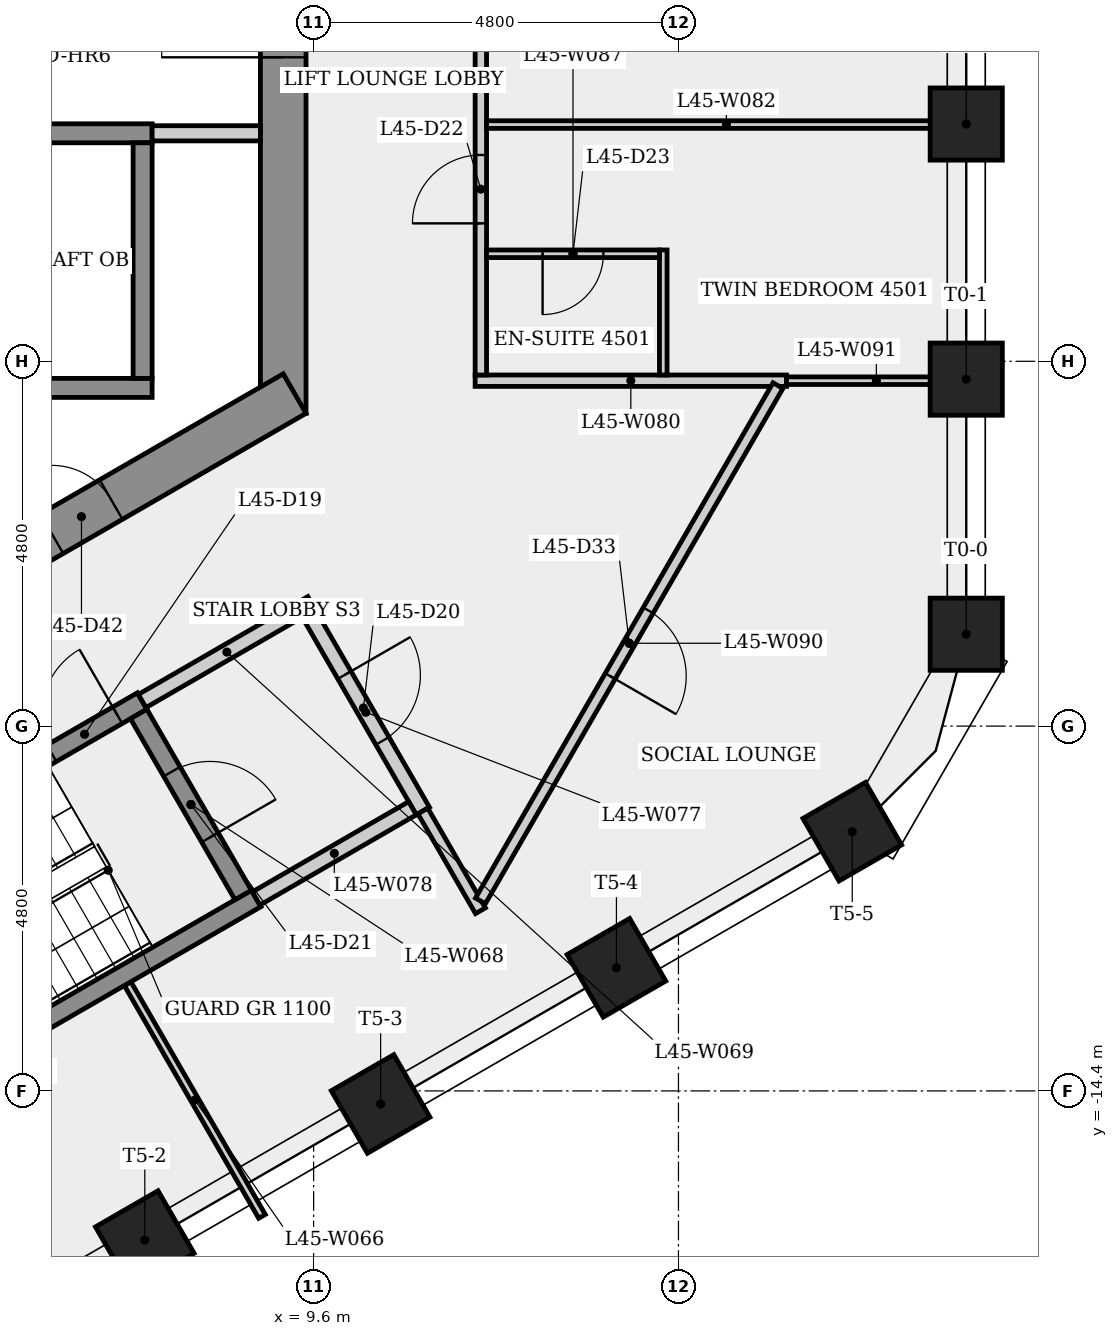
"""IFC4 building model, lengths in metres.
Left out: names, types, materials, properties, quantities, classifications, styles, units other than length and angle.
Written with IfcOpenShell. Run it as: python <this file> out.ifc"""

import sys

from ifc_helpers import new_model, si_unit, direction, frame, frame_2d, origin, origin_2d, place, context, subcontext, project, spatial, rectangle, extrude, element, fill, save


model = new_model("IFC4")
c1 = context("Model", 3, precision=1e-05, world=origin(), true_north=direction((0.0, 1.0)))
c2 = subcontext(c1, "Body", "Model", "MODEL_VIEW")
j1 = project(units=[si_unit("LENGTHUNIT", "METRE"), si_unit("PLANEANGLEUNIT", "RADIAN")], contexts=[c1])
p1 = place(None, origin())
s1 = spatial("IfcSite", under=j1, at=p1, CompositionType="ELEMENT")
p2 = place(p1, origin())
s2 = spatial("IfcBuilding", under=s1, at=p2, CompositionType="ELEMENT")
p3 = place(p2, frame((0.0, 0.0, 169.7)))
s3 = spatial("IfcBuildingStorey", under=s2, at=p3, CompositionType="ELEMENT", Elevation=169.7)
p4 = place(p3, frame((9.2, -5.485, 0.0), z_axis=(0.0, 0.0, 1.0), x_axis=(0.0, 1.0, 0.0)))
e1 = element("IfcWall", 1, at=p4, inside=s3, PredefinedType="SHEAR", context=c2, shape_type="SweptSolid", body=[
    extrude(rectangle(XDim=10.97, YDim=0.6, at=frame_2d((5.485, 0.0))), origin(), (0.0, 0.0, 1.0), 3.4),
])
p5 = place(p4, frame((4.685, 0.0, 0.0)))
e2 = element("IfcOpeningElement", 2, at=p5, cuts=e1, PredefinedType="OPENING", context=c2, shape_type="SweptSolid", body=[
    extrude(rectangle(XDim=1.6, YDim=2.1, at=frame_2d((0.8, 1.05))), frame((0.0, 0.31, 0.0), z_axis=(0.0, -1.0, 0.0), x_axis=(1.0, 0.0, 0.0)), (0.0, 0.0, 1.0), 0.62),
])
p6 = place(p3, frame((-0.15, -10.71, 0.0), z_axis=(0.0, 0.0, 1.0), x_axis=(0.866023993627, 0.500002442456, 0.0)))
e3 = element("IfcWall", 3, at=p6, inside=s3, PredefinedType="SHEAR", context=c2, shape_type="SweptSolid", body=[
    extrude(rectangle(XDim=10.97, YDim=0.6, at=frame_2d((5.485, 0.0))), origin(), (0.0, 0.0, 1.0), 3.4),
])
p7 = place(p6, frame((7.281, 0.0, 0.0)))
e4 = element("IfcOpeningElement", 4, at=p7, cuts=e3, PredefinedType="OPENING", context=c2, shape_type="SweptSolid", body=[
    extrude(rectangle(XDim=0.9, YDim=2.1, at=frame_2d((0.45, 1.05))), frame((0.0, 0.31, 0.0), z_axis=(0.0, -1.0, 0.0), x_axis=(1.0, 0.0, 0.0)), (0.0, 0.0, 1.0), 0.62),
])
for number, where, z_axis, x_axis in (
    (5, (18.187, -8.391, 0.0), (0.0, 0.0, 1.0), (1.0, 0.0, 0.0)),
    (6, (18.187, -5.035, 0.0), (0.0, 0.0, 1.0), (1.0, 0.0, 0.0)),
    (7, (18.187, -1.678, 0.0), (0.0, 0.0, 1.0), (1.0, 0.0, 0.0)),
    (8, (7.379, -16.363, 0.0), (0.0, 0.0, 1.0), (0.5, -0.866, 0.0)),
    (9, (10.481, -14.572, 0.0), (0.0, 0.0, 1.0), (0.5, -0.866, 0.0)),
    (10, (13.584, -12.781, 0.0), (0.0, 0.0, 1.0), (0.5, -0.866, 0.0)),
    (11, (16.687, -10.989, 0.0), (0.0, 0.0, 1.0), (0.5, -0.866, 0.0)),
):
    element("IfcColumn", number, at=place(p3, frame(where, z_axis=z_axis, x_axis=x_axis)), inside=s3, PredefinedType="COLUMN", context=c2, shape_type="SweptSolid", body=[
        extrude(rectangle(XDim=0.95, YDim=0.95, at=origin_2d()), origin(), (0.0, 0.0, 1.0), 3.4),
    ])
p8 = place(p3, frame((1.585, -12.595, 0.0), z_axis=(0.0, 0.0, 1.0), x_axis=(0.866036417653, 0.499980922934, 0.0)))
e12 = element("IfcWall", 12, at=p8, inside=s3, PredefinedType="SHEAR", context=c2, shape_type="SweptSolid", body=[
    extrude(rectangle(XDim=6.65, YDim=0.25, at=frame_2d((3.325, 0.0))), origin(), (0.0, 0.0, 1.0), 3.05),
])
p9 = place(p8, frame((5.275, 0.0, 0.0)))
e13 = element("IfcOpeningElement", 13, at=p9, cuts=e12, PredefinedType="OPENING", context=c2, shape_type="SweptSolid", body=[
    extrude(rectangle(XDim=1.0, YDim=2.1, at=frame_2d((0.5, 1.05))), frame((0.0, 0.135, 0.0), z_axis=(0.0, -1.0, 0.0), x_axis=(1.0, 0.0, 0.0)), (0.0, 0.0, 1.0), 0.27),
])
p10 = place(p3, frame((2.575, -5.15, 0.0), z_axis=(0.0, 0.0, 1.0), x_axis=(1.0, 0.0, 0.0)))
e14 = element("IfcWall", 14, at=p10, inside=s3, PredefinedType="SHEAR", context=c2, shape_type="SweptSolid", body=[
    extrude(rectangle(XDim=4.9, YDim=0.25, at=frame_2d((2.45, 0.0))), origin(), (0.0, 0.0, 1.0), 3.05),
])
p11 = place(p3, frame((2.575, -1.8, 0.0), z_axis=(0.0, 0.0, 1.0), x_axis=(1.0, 0.0, 0.0)))
e15 = element("IfcWall", 15, at=p11, inside=s3, PredefinedType="SHEAR", context=c2, shape_type="SweptSolid", body=[
    extrude(rectangle(XDim=4.9, YDim=0.25, at=frame_2d((2.45, 0.0))), origin(), (0.0, 0.0, 1.0), 3.05),
])
p12 = place(p11, frame((0.597, 0.0, 0.0)))
e16 = element("IfcOpeningElement", 16, at=p12, cuts=e15, PredefinedType="OPENING", context=c2, shape_type="SweptSolid", body=[
    extrude(rectangle(XDim=1.1, YDim=2.1, at=frame_2d((0.55, 1.05))), frame((0.0, 0.135, 0.0), z_axis=(0.0, -1.0, 0.0), x_axis=(1.0, 0.0, 0.0)), (0.0, 0.0, 1.0), 0.27),
])
p13 = place(p3, frame((7.153, -12.989, 0.0), z_axis=(0.0, 0.0, 1.0), x_axis=(0.500045204515, -0.865999303373, 0.0)))
e17 = element("IfcWall", 17, at=p13, inside=s3, PredefinedType="PARTITIONING", context=c2, shape_type="SweptSolid", body=[
    extrude(rectangle(XDim=3.536, YDim=0.1, at=frame_2d((1.768, 0.0))), origin(), (0.0, 0.0, 1.0), 3.05),
])
p14 = place(p3, frame((3.301, -15.068, 0.0), z_axis=(0.0, 0.0, 1.0), x_axis=(0.866035036182, 0.499983315828, 0.0)))
e18 = element("IfcWall", 18, at=p14, inside=s3, PredefinedType="SHEAR", context=c2, shape_type="SweptSolid", body=[
    extrude(rectangle(XDim=6.4, YDim=0.25, at=frame_2d((3.2, 0.0))), origin(), (0.0, 0.0, 1.0), 3.05),
])
p15 = place(p3, frame((7.298, -9.441, 0.0), z_axis=(0.0, 0.0, 1.0), x_axis=(0.500034990121, -0.866005201286, 0.0)))
e19 = element("IfcWall", 19, at=p15, inside=s3, PredefinedType="SHEAR", context=c2, shape_type="SweptSolid", body=[
    extrude(rectangle(XDim=2.75, YDim=0.25, at=frame_2d((1.375, 0.0))), origin(), (0.0, 0.0, 1.0), 3.05),
])
p16 = place(p15, frame((0.875, 0.0, 0.0)))
e20 = element("IfcOpeningElement", 20, at=p16, cuts=e19, PredefinedType="OPENING", context=c2, shape_type="SweptSolid", body=[
    extrude(rectangle(XDim=1.0, YDim=2.1, at=frame_2d((0.5, 1.05))), frame((0.0, 0.135, 0.0), z_axis=(0.0, -1.0, 0.0), x_axis=(1.0, 0.0, 0.0)), (0.0, 0.0, 1.0), 0.27),
])
p17 = place(p3, frame((7.344, -9.27, 0.0), z_axis=(0.0, 0.0, 1.0), x_axis=(0.866005588531, 0.500034319456, 0.0)))
e21 = element("IfcWall", 21, at=p17, inside=s3, PredefinedType="PARTITIONING", context=c2, shape_type="SweptSolid", body=[
    extrude(rectangle(XDim=2.575, YDim=0.2, at=frame_2d((1.288, 0.0))), origin(), (0.0, 0.0, 1.0), 3.05),
])
p18 = place(p3, frame((7.35, -1.925, 0.0), z_axis=(0.0, 0.0, 1.0), x_axis=(0.0, -1.0, 0.0)))
e22 = element("IfcWall", 22, at=p18, inside=s3, PredefinedType="SHEAR", context=c2, shape_type="SweptSolid", body=[
    extrude(rectangle(XDim=3.1, YDim=0.25, at=frame_2d((1.55, 0.0))), origin(), (0.0, 0.0, 1.0), 3.4),
])
p19 = place(p3, frame((8.9, -1.8, 0.0), z_axis=(0.0, 0.0, 1.0), x_axis=(-1.0, 0.0, 0.0)))
e23 = element("IfcWall", 23, at=p19, inside=s3, PredefinedType="PARTITIONING", context=c2, shape_type="SweptSolid", body=[
    extrude(rectangle(XDim=1.425, YDim=0.2, at=frame_2d((0.712, 0.0))), origin(), (0.0, 0.0, 1.0), 3.05),
])
p20 = place(p3, frame((9.537, -8.119, 0.0), z_axis=(0.0, 0.0, 1.0), x_axis=(0.499990139034, -0.866031096941, 0.0)))
e24 = element("IfcWall", 24, at=p20, inside=s3, PredefinedType="PARTITIONING", context=c2, shape_type="SweptSolid", body=[
    extrude(rectangle(XDim=3.0, YDim=0.2, at=frame_2d((1.5, 0.0))), origin(), (0.0, 0.0, 1.0), 3.05),
])
p21 = place(p20, frame((0.935, 0.0, 0.0)))
e25 = element("IfcOpeningElement", 25, at=p21, cuts=e24, PredefinedType="OPENING", context=c2, shape_type="SweptSolid", body=[
    extrude(rectangle(XDim=1.0, YDim=2.1, at=frame_2d((0.5, 1.05))), frame((0.0, 0.11, 0.0), z_axis=(0.0, -1.0, 0.0), x_axis=(1.0, 0.0, 0.0)), (0.0, 0.0, 1.0), 0.22),
])
p22 = place(p3, frame((10.901, -10.681, 0.0), z_axis=(0.0, 0.0, 1.0), x_axis=(-0.866007538022, -0.500030943131, 0.0)))
e26 = element("IfcWall", 26, at=p22, inside=s3, PredefinedType="PARTITIONING", context=c2, shape_type="SweptSolid", body=[
    extrude(rectangle(XDim=2.375, YDim=0.2, at=frame_2d((1.188, 0.0))), origin(), (0.0, 0.0, 1.0), 3.05),
])
p23 = place(p3, frame((11.795, -12.03, 0.0), z_axis=(0.0, 0.0, 1.0), x_axis=(-0.499899100862, 0.866083650092, 0.0)))
e27 = element("IfcWall", 27, at=p23, inside=s3, PredefinedType="PARTITIONING", context=c2, shape_type="SweptSolid", body=[
    extrude(rectangle(XDim=1.515, YDim=0.15, at=frame_2d((0.758, 0.0))), origin(), (0.0, 0.0, 1.0), 3.05),
])
p24 = place(p3, frame((11.725, -5.055, 0.0), z_axis=(0.0, 0.0, 1.0), x_axis=(1.0, 0.0, 0.0)))
e28 = element("IfcWall", 28, at=p24, inside=s3, PredefinedType="PARTITIONING", context=c2, shape_type="SweptSolid", body=[
    extrude(rectangle(XDim=4.097, YDim=0.15, at=frame_2d((2.048, 0.0))), origin(), (0.0, 0.0, 1.0), 3.05),
])
p25 = place(p3, frame((11.8, -4.98, 0.0), z_axis=(0.0, 0.0, 1.0), x_axis=(0.0, 1.0, 0.0)))
e29 = element("IfcWall", 29, at=p25, inside=s3, PredefinedType="PARTITIONING", context=c2, shape_type="SweptSolid", body=[
    extrude(rectangle(XDim=10.11, YDim=0.15, at=frame_2d((5.055, 0.0))), origin(), (0.0, 0.0, 1.0), 3.05),
])
p26 = place(p25, frame((1.995, 0.0, 0.0)))
e30 = element("IfcOpeningElement", 30, at=p26, cuts=e29, PredefinedType="OPENING", context=c2, shape_type="SweptSolid", body=[
    extrude(rectangle(XDim=0.9, YDim=2.1, at=frame_2d((0.45, 1.05))), frame((0.0, 0.085, 0.0), z_axis=(0.0, -1.0, 0.0), x_axis=(1.0, 0.0, 0.0)), (0.0, 0.0, 1.0), 0.17),
])
p27 = place(p25, frame((6.165, 0.0, 0.0)))
e31 = element("IfcOpeningElement", 31, at=p27, cuts=e29, PredefinedType="OPENING", context=c2, shape_type="SweptSolid", body=[
    extrude(rectangle(XDim=1.0, YDim=2.1, at=frame_2d((0.5, 1.05))), frame((0.0, 0.085, 0.0), z_axis=(0.0, -1.0, 0.0), x_axis=(1.0, 0.0, 0.0)), (0.0, 0.0, 1.0), 0.17),
])
p28 = place(p3, frame((11.875, -1.685, 0.0), z_axis=(0.0, 0.0, 1.0), x_axis=(1.0, 0.0, 0.0)))
e32 = element("IfcWall", 32, at=p28, inside=s3, PredefinedType="PARTITIONING", context=c2, shape_type="SweptSolid", body=[
    extrude(rectangle(XDim=6.312, YDim=0.1, at=frame_2d((3.156, 0.0))), origin(), (0.0, 0.0, 1.0), 3.05),
])
p29 = place(p3, frame((14.2, -4.98, 0.0), z_axis=(0.0, 0.0, 1.0), x_axis=(0.0, 1.0, 0.0)))
e33 = element("IfcWall", 33, at=p29, inside=s3, PredefinedType="PARTITIONING", context=c2, shape_type="SweptSolid", body=[
    extrude(rectangle(XDim=1.645, YDim=0.1, at=frame_2d((0.823, 0.0))), origin(), (0.0, 0.0, 1.0), 3.05),
])
p30 = place(p3, frame((14.15, -3.385, 0.0), z_axis=(0.0, 0.0, 1.0), x_axis=(-1.0, 0.0, 0.0)))
e34 = element("IfcWall", 34, at=p30, inside=s3, PredefinedType="PARTITIONING", context=c2, shape_type="SweptSolid", body=[
    extrude(rectangle(XDim=2.275, YDim=0.1, at=frame_2d((1.137, 0.0))), origin(), (0.0, 0.0, 1.0), 3.05),
])
p31 = place(p30, frame((0.738, 0.0, 0.0)))
e35 = element("IfcOpeningElement", 35, at=p31, cuts=e34, PredefinedType="OPENING", context=c2, shape_type="SweptSolid", body=[
    extrude(rectangle(XDim=0.8, YDim=2.1, at=frame_2d((0.4, 1.05))), frame((0.0, 0.06, 0.0), z_axis=(0.0, -1.0, 0.0), x_axis=(1.0, 0.0, 0.0)), (0.0, 0.0, 1.0), 0.12),
])
p32 = place(p3, frame((15.709, -5.12, 0.0), z_axis=(0.0, 0.0, 1.0), x_axis=(-0.499989717029, -0.866031340579, 0.0)))
e36 = element("IfcWall", 36, at=p32, inside=s3, PredefinedType="PARTITIONING", context=c2, shape_type="SweptSolid", body=[
    extrude(rectangle(XDim=7.828, YDim=0.15, at=frame_2d((3.914, 0.0))), origin(), (0.0, 0.0, 1.0), 3.05),
])
p33 = place(p32, frame((3.414, 0.0, 0.0)))
e37 = element("IfcOpeningElement", 37, at=p33, cuts=e36, PredefinedType="OPENING", context=c2, shape_type="SweptSolid", body=[
    extrude(rectangle(XDim=1.0, YDim=2.1, at=frame_2d((0.5, 1.05))), frame((0.0, 0.085, 0.0), z_axis=(0.0, -1.0, 0.0), x_axis=(1.0, 0.0, 0.0)), (0.0, 0.0, 1.0), 0.17),
])
p34 = place(p3, frame((18.187, -5.055, 0.0), z_axis=(0.0, 0.0, 1.0), x_axis=(-1.0, 0.0, 0.0)))
e38 = element("IfcWall", 38, at=p34, inside=s3, PredefinedType="PARTITIONING", context=c2, shape_type="SweptSolid", body=[
    extrude(rectangle(XDim=2.365, YDim=0.1, at=frame_2d((1.183, 0.0))), origin(), (0.0, 0.0, 1.0), 3.05),
])
p35 = place(p9, origin())
e39 = element("IfcDoor", 39, at=p35, inside=s3, OperationType="SINGLE_SWING_RIGHT", PredefinedType="DOOR", context=c2, shape_type="SweptSolid", body=[
    extrude(rectangle(XDim=1.0, YDim=2.1, at=frame_2d((0.5, 1.05))), frame((0.0, 0.025, 0.0), z_axis=(0.0, -1.0, 0.0), x_axis=(1.0, 0.0, 0.0)), (0.0, 0.0, 1.0), 0.05),
])
fill(e13, e39)
p36 = place(p21, origin())
e40 = element("IfcDoor", 40, at=p36, inside=s3, OperationType="SINGLE_SWING_LEFT", PredefinedType="DOOR", context=c2, shape_type="SweptSolid", body=[
    extrude(rectangle(XDim=1.0, YDim=2.1, at=frame_2d((0.5, 1.05))), frame((0.0, 0.025, 0.0), z_axis=(0.0, -1.0, 0.0), x_axis=(1.0, 0.0, 0.0)), (0.0, 0.0, 1.0), 0.05),
])
fill(e25, e40)
p37 = place(p16, origin())
e41 = element("IfcDoor", 41, at=p37, inside=s3, OperationType="SINGLE_SWING_RIGHT", PredefinedType="DOOR", context=c2, shape_type="SweptSolid", body=[
    extrude(rectangle(XDim=1.0, YDim=2.1, at=frame_2d((0.5, 1.05))), frame((0.0, 0.025, 0.0), z_axis=(0.0, -1.0, 0.0), x_axis=(1.0, 0.0, 0.0)), (0.0, 0.0, 1.0), 0.05),
])
fill(e20, e41)
p38 = place(p26, origin())
e42 = element("IfcDoor", 42, at=p38, inside=s3, OperationType="SINGLE_SWING_LEFT", PredefinedType="DOOR", context=c2, shape_type="SweptSolid", body=[
    extrude(rectangle(XDim=0.9, YDim=2.1, at=frame_2d((0.45, 1.05))), frame((0.0, 0.025, 0.0), z_axis=(0.0, -1.0, 0.0), x_axis=(1.0, 0.0, 0.0)), (0.0, 0.0, 1.0), 0.05),
])
fill(e30, e42)
p39 = place(p31, origin())
e43 = element("IfcDoor", 43, at=p39, inside=s3, OperationType="SINGLE_SWING_RIGHT", PredefinedType="DOOR", context=c2, shape_type="SweptSolid", body=[
    extrude(rectangle(XDim=0.8, YDim=2.1, at=frame_2d((0.4, 1.05))), frame((0.0, 0.025, 0.0), z_axis=(0.0, -1.0, 0.0), x_axis=(1.0, 0.0, 0.0)), (0.0, 0.0, 1.0), 0.05),
])
fill(e35, e43)
p40 = place(p33, origin())
e44 = element("IfcDoor", 44, at=p40, inside=s3, OperationType="SINGLE_SWING_RIGHT", PredefinedType="DOOR", context=c2, shape_type="SweptSolid", body=[
    extrude(rectangle(XDim=1.0, YDim=2.1, at=frame_2d((0.5, 1.05))), frame((0.0, 0.025, 0.0), z_axis=(0.0, -1.0, 0.0), x_axis=(1.0, 0.0, 0.0)), (0.0, 0.0, 1.0), 0.05),
])
fill(e37, e44)
p41 = place(p7, origin())
e45 = element("IfcDoor", 45, at=p41, inside=s3, OperationType="SINGLE_SWING_LEFT", PredefinedType="DOOR", context=c2, shape_type="SweptSolid", body=[
    extrude(rectangle(XDim=0.9, YDim=2.1, at=frame_2d((0.45, 1.05))), frame((0.0, 0.025, 0.0), z_axis=(0.0, -1.0, 0.0), x_axis=(1.0, 0.0, 0.0)), (0.0, 0.0, 1.0), 0.05),
])
fill(e4, e45)
p42 = place(p5, origin())
e46 = element("IfcDoor", 46, at=p42, inside=s3, OperationType="SINGLE_SWING_LEFT", PredefinedType="DOOR", context=c2, shape_type="SweptSolid", body=[
    extrude(rectangle(XDim=1.6, YDim=2.1, at=frame_2d((0.8, 1.05))), frame((0.0, 0.025, 0.0), z_axis=(0.0, -1.0, 0.0), x_axis=(1.0, 0.0, 0.0)), (0.0, 0.0, 1.0), 0.05),
])
fill(e2, e46)
save(model, sys.argv[1])
